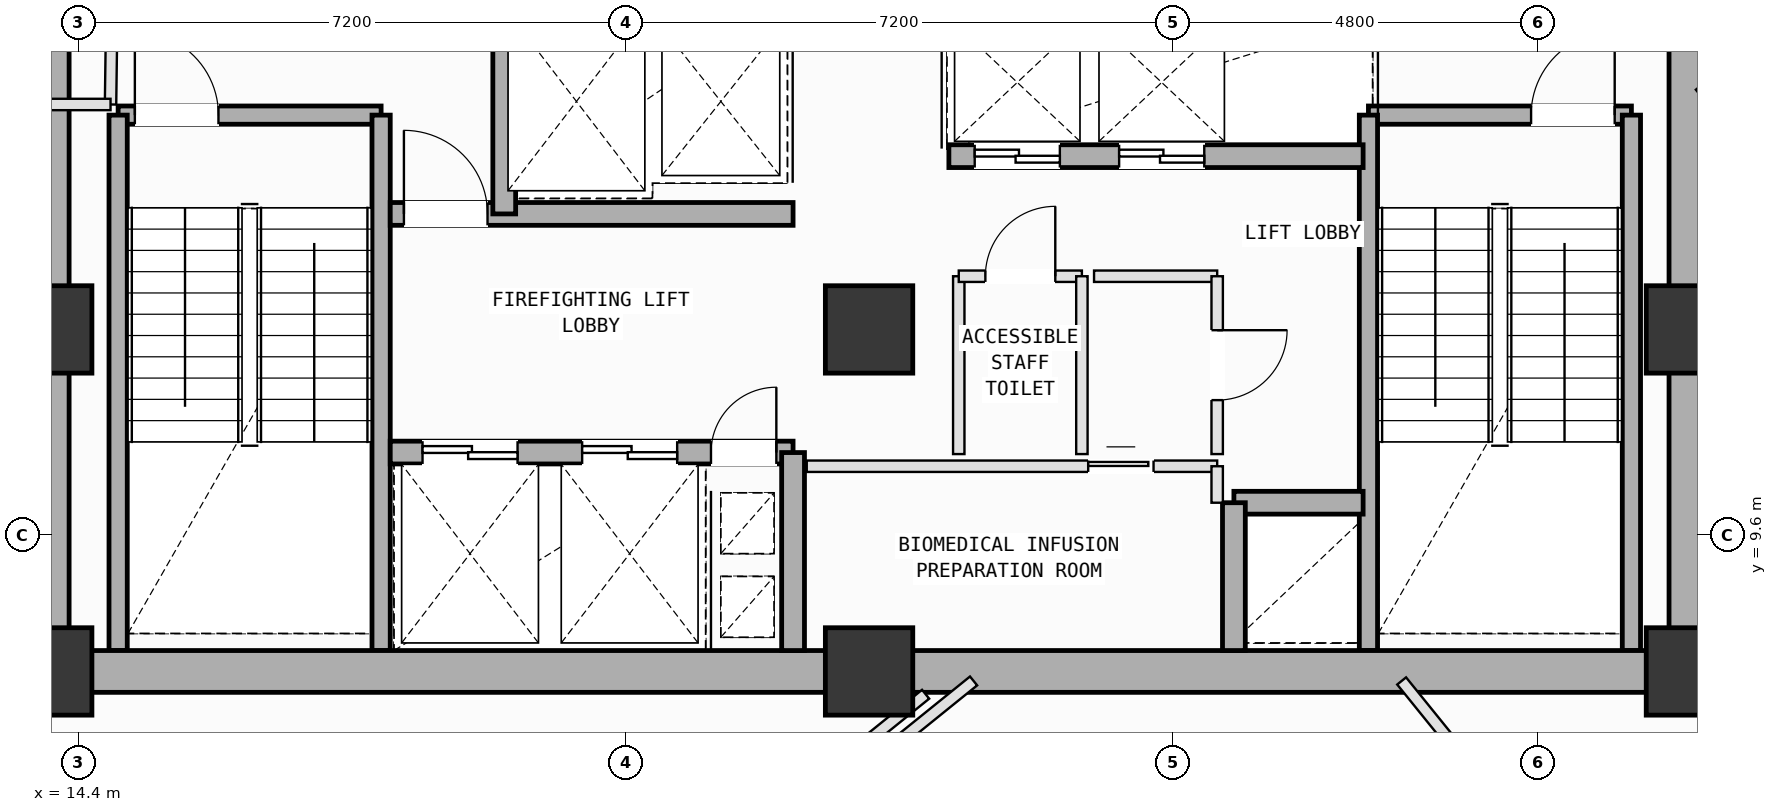
"""IFC4 building model, lengths in metres.
Left out: names, types, materials, properties, quantities, classifications, styles, units other than length and angle.
Written with IfcOpenShell. Run it as: python <this file> out.ifc"""

import sys

from ifc_helpers import new_model, si_unit, direction, frame, frame_2d, origin, origin_2d, place, context, subcontext, project, spatial, rectangle, extrude, element, fill, save


model = new_model("IFC4")
c1 = context("Model", 3, precision=1e-05, world=origin(), true_north=direction((0.0, 1.0)))
c2 = subcontext(c1, "Body", "Model", "MODEL_VIEW")
j1 = project(units=[si_unit("LENGTHUNIT", "METRE"), si_unit("PLANEANGLEUNIT", "RADIAN")], contexts=[c1])
p1 = place(None, origin())
s1 = spatial("IfcSite", under=j1, at=p1, CompositionType="ELEMENT")
p2 = place(p1, origin())
s2 = spatial("IfcBuilding", under=s1, at=p2, CompositionType="ELEMENT")
p3 = place(p2, frame((0.0, 0.0, 189.8)))
s3 = spatial("IfcBuildingStorey", under=s2, at=p3, CompositionType="ELEMENT", Elevation=189.8)
for number, where, z_axis, x_axis in (
    (1, (14.0, 7.8, 0.0), (0.0, 0.0, 1.0), (1.0, 0.0, 0.0)),
    (2, (14.0, 12.3, 0.0), (0.0, 0.0, 1.0), (1.0, 0.0, 0.0)),
    (3, (24.8, 7.8, 0.0), (0.0, 0.0, 1.0), (1.0, 0.0, 0.0)),
    (4, (24.8, 12.3, 0.0), (0.0, 0.0, 1.0), (1.0, 0.0, 0.0)),
    (5, (35.6, 7.8, 0.0), (0.0, 0.0, 1.0), (1.0, 0.0, 0.0)),
    (6, (35.6, 12.3, 0.0), (0.0, 0.0, 1.0), (1.0, 0.0, 0.0)),
):
    element("IfcColumn", number, at=place(p3, frame(where, z_axis=z_axis, x_axis=x_axis)), inside=s3, PredefinedType="COLUMN", context=c2, shape_type="SweptSolid", body=[
        extrude(rectangle(XDim=1.15, YDim=1.15, at=origin_2d()), origin(), (0.0, 0.0, 1.0), 4.0),
    ])
p4 = place(p3, frame((16.108, 2.773, 0.0), z_axis=(0.0, 0.0, 1.0), x_axis=(-0.628635084849, 0.777700411532, 0.0)))
e7 = element("IfcWall", 7, at=p4, inside=s3, PredefinedType="SOLIDWALL", context=c2, shape_type="SweptSolid", body=[
    extrude(rectangle(XDim=7.36, YDim=0.28, at=frame_2d((3.68, 0.0))), origin(), (0.0, 0.0, 1.0), 3.265),
])
p5 = place(p4, frame((2.088, 0.0, 0.75)))
e8 = element("IfcOpeningElement", 8, at=p5, cuts=e7, PredefinedType="OPENING", context=c2, shape_type="SweptSolid", body=[
    extrude(rectangle(XDim=1.4, YDim=1.85, at=frame_2d((0.7, 0.925))), frame((0.0, 0.15, 0.0), z_axis=(0.0, -1.0, 0.0), x_axis=(1.0, 0.0, 0.0)), (0.0, 0.0, 1.0), 0.3),
])
p6 = place(p3, frame((14.92, 15.12, 0.0), z_axis=(0.0, 0.0, 1.0), x_axis=(1.0, 0.0, 0.0)))
e9 = element("IfcWall", 9, at=p6, inside=s3, PredefinedType="SOLIDWALL", context=c2, shape_type="SweptSolid", body=[
    extrude(rectangle(XDim=3.46, YDim=0.24, at=frame_2d((1.73, 0.0))), origin(), (0.0, 0.0, 1.0), 3.78),
])
p7 = place(p6, frame((0.22, 0.0, 0.0)))
e10 = element("IfcOpeningElement", 10, at=p7, cuts=e9, PredefinedType="OPENING", context=c2, shape_type="SweptSolid", body=[
    extrude(rectangle(XDim=1.1, YDim=2.15, at=frame_2d((0.55, 1.075))), frame((0.0, 0.13, 0.0), z_axis=(0.0, -1.0, 0.0), x_axis=(1.0, 0.0, 0.0)), (0.0, 0.0, 1.0), 0.26),
])
for number, where, z_axis, x_axis in (
    (11, (18.38, 15.12, 0.0), (0.0, 0.0, 1.0), (0.0, -1.0, 0.0)),
    (12, (14.92, 8.075, 0.0), (0.0, 0.0, 1.0), (0.0, 1.0, 0.0)),
):
    element("IfcWall", number, at=place(p3, frame(where, z_axis=z_axis, x_axis=x_axis)), inside=s3, PredefinedType="SOLIDWALL", context=c2, shape_type="SweptSolid", body=[
        extrude(rectangle(XDim=7.045, YDim=0.24, at=frame_2d((3.522, 0.0))), origin(), (0.0, 0.0, 1.0), 3.78),
    ])
p8 = place(p3, frame((31.37, 15.12, 0.0), z_axis=(0.0, 0.0, 1.0), x_axis=(1.0, 0.0, 0.0)))
e13 = element("IfcWall", 13, at=p8, inside=s3, PredefinedType="SOLIDWALL", context=c2, shape_type="SweptSolid", body=[
    extrude(rectangle(XDim=3.46, YDim=0.24, at=frame_2d((1.73, 0.0))), origin(), (0.0, 0.0, 1.0), 3.78),
])
p9 = place(p8, frame((2.14, 0.0, 0.0)))
e14 = element("IfcOpeningElement", 14, at=p9, cuts=e13, PredefinedType="OPENING", context=c2, shape_type="SweptSolid", body=[
    extrude(rectangle(XDim=1.1, YDim=2.15, at=frame_2d((0.55, 1.075))), frame((0.0, 0.13, 0.0), z_axis=(0.0, -1.0, 0.0), x_axis=(1.0, 0.0, 0.0)), (0.0, 0.0, 1.0), 0.26),
])
for number, where, z_axis, x_axis in (
    (15, (34.83, 15.12, 0.0), (0.0, 0.0, 1.0), (0.0, -1.0, 0.0)),
    (16, (31.37, 8.075, 0.0), (0.0, 0.0, 1.0), (0.0, 1.0, 0.0)),
):
    element("IfcWall", number, at=place(p3, frame(where, z_axis=z_axis, x_axis=x_axis)), inside=s3, PredefinedType="SOLIDWALL", context=c2, shape_type="SweptSolid", body=[
        extrude(rectangle(XDim=7.045, YDim=0.24, at=frame_2d((3.522, 0.0))), origin(), (0.0, 0.0, 1.0), 3.78),
    ])
for number, where, z_axis, x_axis in (
    (17, (14.0, 7.8, 0.0), (0.0, 0.0, 1.0), (1.0, 0.0, 0.0)),
    (18, (24.8, 7.8, 0.0), (0.0, 0.0, 1.0), (1.0, 0.0, 0.0)),
):
    element("IfcWall", number, at=place(p3, frame(where, z_axis=z_axis, x_axis=x_axis)), inside=s3, PredefinedType="SHEAR", context=c2, shape_type="SweptSolid", body=[
        extrude(rectangle(XDim=10.8, YDim=0.55, at=frame_2d((5.4, 0.0))), origin(), (0.0, 0.0, 1.0), 3.78),
    ])
for number, where, z_axis, x_axis in (
    (19, (35.6, 7.8, 0.0), (0.0, 0.0, 1.0), (0.0, 1.0, 0.0)),
    (20, (14.0, 16.8, 0.0), (0.0, 0.0, 1.0), (0.0, -1.0, 0.0)),
):
    element("IfcWall", number, at=place(p3, frame(where, z_axis=z_axis, x_axis=x_axis)), inside=s3, PredefinedType="SHEAR", context=c2, shape_type="SweptSolid", body=[
        extrude(rectangle(XDim=9.0, YDim=0.55, at=frame_2d((4.5, 0.0))), origin(), (0.0, 0.0, 1.0), 3.78),
    ])
p10 = place(p3, frame((18.5, 10.68, 0.0), z_axis=(0.0, 0.0, 1.0), x_axis=(1.0, 0.0, 0.0)))
e21 = element("IfcWall", 21, at=p10, inside=s3, PredefinedType="SOLIDWALL", context=c2, shape_type="SweptSolid", body=[
    extrude(rectangle(XDim=5.3, YDim=0.3, at=frame_2d((2.65, 0.0))), origin(), (0.0, 0.0, 1.0), 3.78),
])
p11 = place(p10, frame((4.22, 0.0, 0.0)))
e22 = element("IfcOpeningElement", 22, at=p11, cuts=e21, PredefinedType="OPENING", context=c2, shape_type="SweptSolid", body=[
    extrude(rectangle(XDim=0.86, YDim=2.06, at=frame_2d((0.43, 1.03))), frame((0.0, 0.16, 0.0), z_axis=(0.0, -1.0, 0.0), x_axis=(1.0, 0.0, 0.0)), (0.0, 0.0, 1.0), 0.32),
])
p12 = place(p10, frame((0.425, 0.0, 0.0)))
e23 = element("IfcOpeningElement", 23, at=p12, cuts=e21, PredefinedType="OPENING", context=c2, shape_type="SweptSolid", body=[
    extrude(rectangle(XDim=1.25, YDim=2.18, at=frame_2d((0.625, 1.09))), frame((0.0, 0.16, 0.0), z_axis=(0.0, -1.0, 0.0), x_axis=(1.0, 0.0, 0.0)), (0.0, 0.0, 1.0), 0.32),
])
p13 = place(p10, frame((2.525, 0.0, 0.0)))
e24 = element("IfcOpeningElement", 24, at=p13, cuts=e21, PredefinedType="OPENING", context=c2, shape_type="SweptSolid", body=[
    extrude(rectangle(XDim=1.25, YDim=2.18, at=frame_2d((0.625, 1.09))), frame((0.0, 0.16, 0.0), z_axis=(0.0, -1.0, 0.0), x_axis=(1.0, 0.0, 0.0)), (0.0, 0.0, 1.0), 0.32),
])
p14 = place(p3, frame((18.5, 13.82, 0.0), z_axis=(0.0, 0.0, 1.0), x_axis=(1.0, 0.0, 0.0)))
e25 = element("IfcWall", 25, at=p14, inside=s3, PredefinedType="SOLIDWALL", context=c2, shape_type="SweptSolid", body=[
    extrude(rectangle(XDim=5.3, YDim=0.3, at=frame_2d((2.65, 0.0))), origin(), (0.0, 0.0, 1.0), 3.78),
])
p15 = place(p14, frame((0.18, 0.0, 0.0)))
e26 = element("IfcOpeningElement", 26, at=p15, cuts=e25, PredefinedType="OPENING", context=c2, shape_type="SweptSolid", body=[
    extrude(rectangle(XDim=1.1, YDim=2.15, at=frame_2d((0.55, 1.075))), frame((0.0, 0.16, 0.0), z_axis=(0.0, -1.0, 0.0), x_axis=(1.0, 0.0, 0.0)), (0.0, 0.0, 1.0), 0.32),
])
p16 = place(p3, frame((23.8, 8.075, 0.0), z_axis=(0.0, 0.0, 1.0), x_axis=(0.0, 1.0, 0.0)))
e27 = element("IfcWall", 27, at=p16, inside=s3, PredefinedType="SOLIDWALL", context=c2, shape_type="SweptSolid", body=[
    extrude(rectangle(XDim=2.605, YDim=0.3, at=frame_2d((1.302, 0.0))), origin(), (0.0, 0.0, 1.0), 3.78),
])
p17 = place(p3, frame((20.0, 13.82, 0.0), z_axis=(0.0, 0.0, 1.0), x_axis=(0.0, 1.0, 0.0)))
e28 = element("IfcWall", 28, at=p17, inside=s3, PredefinedType="SOLIDWALL", context=c2, shape_type="SweptSolid", body=[
    extrude(rectangle(XDim=2.73, YDim=0.3, at=frame_2d((1.365, 0.0))), origin(), (0.0, 0.0, 1.0), 3.78),
])
p18 = place(p3, frame((29.6, 10.02, 0.0), z_axis=(0.0, 0.0, 1.0), x_axis=(1.0, 0.0, 0.0)))
e29 = element("IfcWall", 29, at=p18, inside=s3, PredefinedType="SOLIDWALL", context=c2, shape_type="SweptSolid", body=[
    extrude(rectangle(XDim=1.7, YDim=0.3, at=frame_2d((0.85, 0.0))), origin(), (0.0, 0.0, 1.0), 3.78),
])
p19 = place(p3, frame((29.6, 8.075, 0.0), z_axis=(0.0, 0.0, 1.0), x_axis=(0.0, 1.0, 0.0)))
e30 = element("IfcWall", 30, at=p19, inside=s3, PredefinedType="SOLIDWALL", context=c2, shape_type="SweptSolid", body=[
    extrude(rectangle(XDim=1.945, YDim=0.3, at=frame_2d((0.973, 0.0))), origin(), (0.0, 0.0, 1.0), 3.78),
])
p20 = place(p3, frame((25.85, 14.58, 0.0), z_axis=(0.0, 0.0, 1.0), x_axis=(1.0, 0.0, 0.0)))
e31 = element("IfcWall", 31, at=p20, inside=s3, PredefinedType="SOLIDWALL", context=c2, shape_type="SweptSolid", body=[
    extrude(rectangle(XDim=5.45, YDim=0.3, at=frame_2d((2.725, 0.0))), origin(), (0.0, 0.0, 1.0), 3.78),
])
p21 = place(p20, frame((0.34, 0.0, 0.0)))
e32 = element("IfcOpeningElement", 32, at=p21, cuts=e31, PredefinedType="OPENING", context=c2, shape_type="SweptSolid", body=[
    extrude(rectangle(XDim=1.12, YDim=2.15, at=frame_2d((0.56, 1.075))), frame((0.0, 0.16, 0.0), z_axis=(0.0, -1.0, 0.0), x_axis=(1.0, 0.0, 0.0)), (0.0, 0.0, 1.0), 0.32),
])
p22 = place(p20, frame((2.24, 0.0, 0.0)))
e33 = element("IfcOpeningElement", 33, at=p22, cuts=e31, PredefinedType="OPENING", context=c2, shape_type="SweptSolid", body=[
    extrude(rectangle(XDim=1.12, YDim=2.15, at=frame_2d((0.56, 1.075))), frame((0.0, 0.16, 0.0), z_axis=(0.0, -1.0, 0.0), x_axis=(1.0, 0.0, 0.0)), (0.0, 0.0, 1.0), 0.32),
])
p23 = place(p3, frame((23.98, 10.5, 0.0), z_axis=(0.0, 0.0, 1.0), x_axis=(1.0, 0.0, 0.0)))
e34 = element("IfcWall", 34, at=p23, inside=s3, PredefinedType="PARTITIONING", context=c2, shape_type="SweptSolid", body=[
    extrude(rectangle(XDim=5.4, YDim=0.15, at=frame_2d((2.7, 0.0))), origin(), (0.0, 0.0, 1.0), 3.78),
])
p24 = place(p23, frame((3.703, 0.0, 0.0)))
e35 = element("IfcOpeningElement", 35, at=p24, cuts=e34, PredefinedType="OPENING", context=c2, shape_type="SweptSolid", body=[
    extrude(rectangle(XDim=0.86, YDim=2.06, at=frame_2d((0.43, 1.03))), frame((0.0, 0.085, 0.0), z_axis=(0.0, -1.0, 0.0), x_axis=(1.0, 0.0, 0.0)), (0.0, 0.0, 1.0), 0.17),
])
p25 = place(p3, frame((29.38, 10.5, 0.0), z_axis=(0.0, 0.0, 1.0), x_axis=(0.0, -1.0, 0.0)))
e36 = element("IfcWall", 36, at=p25, inside=s3, PredefinedType="PARTITIONING", context=c2, shape_type="SweptSolid", body=[
    extrude(rectangle(XDim=0.48, YDim=0.15, at=frame_2d((0.24, 0.0))), origin(), (0.0, 0.0, 1.0), 3.78),
])
p26 = place(p3, frame((25.98, 10.66, 0.0), z_axis=(0.0, 0.0, 1.0), x_axis=(0.0, 1.0, 0.0)))
e37 = element("IfcWall", 37, at=p26, inside=s3, PredefinedType="PARTITIONING", context=c2, shape_type="SweptSolid", body=[
    extrude(rectangle(XDim=2.34, YDim=0.15, at=frame_2d((1.17, 0.0))), origin(), (0.0, 0.0, 1.0), 3.78),
])
p27 = place(p3, frame((25.98, 13.0, 0.0), z_axis=(0.0, 0.0, 1.0), x_axis=(1.0, 0.0, 0.0)))
e38 = element("IfcWall", 38, at=p27, inside=s3, PredefinedType="PARTITIONING", context=c2, shape_type="SweptSolid", body=[
    extrude(rectangle(XDim=1.62, YDim=0.15, at=frame_2d((0.81, 0.0))), origin(), (0.0, 0.0, 1.0), 3.78),
])
p28 = place(p27, frame((0.35, 0.0, 0.0)))
e39 = element("IfcOpeningElement", 39, at=p28, cuts=e38, PredefinedType="OPENING", context=c2, shape_type="SweptSolid", body=[
    extrude(rectangle(XDim=0.92, YDim=2.1, at=frame_2d((0.46, 1.05))), frame((0.0, 0.085, 0.0), z_axis=(0.0, -1.0, 0.0), x_axis=(1.0, 0.0, 0.0)), (0.0, 0.0, 1.0), 0.17),
])
p29 = place(p3, frame((27.6, 13.0, 0.0), z_axis=(0.0, 0.0, 1.0), x_axis=(0.0, -1.0, 0.0)))
e40 = element("IfcWall", 40, at=p29, inside=s3, PredefinedType="PARTITIONING", context=c2, shape_type="SweptSolid", body=[
    extrude(rectangle(XDim=2.34, YDim=0.15, at=frame_2d((1.17, 0.0))), origin(), (0.0, 0.0, 1.0), 3.78),
])
p30 = place(p3, frame((27.76, 13.0, 0.0), z_axis=(0.0, 0.0, 1.0), x_axis=(1.0, 0.0, 0.0)))
e41 = element("IfcWall", 41, at=p30, inside=s3, PredefinedType="PARTITIONING", context=c2, shape_type="SweptSolid", body=[
    extrude(rectangle(XDim=1.62, YDim=0.15, at=frame_2d((0.81, 0.0))), origin(), (0.0, 0.0, 1.0), 3.78),
])
p31 = place(p3, frame((29.38, 13.0, 0.0), z_axis=(0.0, 0.0, 1.0), x_axis=(0.0, -1.0, 0.0)))
e42 = element("IfcWall", 42, at=p31, inside=s3, PredefinedType="PARTITIONING", context=c2, shape_type="SweptSolid", body=[
    extrude(rectangle(XDim=2.34, YDim=0.15, at=frame_2d((1.17, 0.0))), origin(), (0.0, 0.0, 1.0), 3.78),
])
p32 = place(p31, frame((0.71, 0.0, 0.0)))
e43 = element("IfcOpeningElement", 43, at=p32, cuts=e42, PredefinedType="OPENING", context=c2, shape_type="SweptSolid", body=[
    extrude(rectangle(XDim=0.92, YDim=2.1, at=frame_2d((0.46, 1.05))), frame((0.0, 0.085, 0.0), z_axis=(0.0, -1.0, 0.0), x_axis=(1.0, 0.0, 0.0)), (0.0, 0.0, 1.0), 0.17),
])
p33 = place(p3, frame((23.639, 5.626, 0.0), z_axis=(0.0, 0.0, 1.0), x_axis=(0.777842628049, 0.628459104468, 0.0)))
e44 = element("IfcWall", 44, at=p33, inside=s3, PredefinedType="PARTITIONING", context=c2, shape_type="SweptSolid", body=[
    extrude(rectangle(XDim=3.26, YDim=0.15, at=frame_2d((1.63, 0.0))), origin(), (0.0, 0.0, 1.0), 3.78),
])
p34 = place(p3, frame((31.807, 7.675, 0.0), z_axis=(0.0, 0.0, 1.0), x_axis=(0.628606219848, -0.777723742963, 0.0)))
e45 = element("IfcWall", 45, at=p34, inside=s3, PredefinedType="PARTITIONING", context=c2, shape_type="SweptSolid", body=[
    extrude(rectangle(XDim=9.945, YDim=0.15, at=frame_2d((4.972, 0.0))), origin(), (0.0, 0.0, 1.0), 3.78),
])
p35 = place(p34, frame((4.736, 0.0, 0.0)))
e46 = element("IfcOpeningElement", 46, at=p35, cuts=e45, PredefinedType="OPENING", context=c2, shape_type="SweptSolid", body=[
    extrude(rectangle(XDim=0.86, YDim=2.06, at=frame_2d((0.43, 1.03))), frame((0.0, 0.085, 0.0), z_axis=(0.0, -1.0, 0.0), x_axis=(1.0, 0.0, 0.0)), (0.0, 0.0, 1.0), 0.17),
])
p36 = place(p3, frame((35.6, 7.5, 0.0), z_axis=(0.0, 0.0, 1.0), x_axis=(1.0, 0.0, 0.0)))
e47 = element("IfcWall", 47, at=p36, inside=s3, PredefinedType="PARTITIONING", context=c2, shape_type="SweptSolid", body=[
    extrude(rectangle(XDim=0.55, YDim=0.15, at=frame_2d((0.275, 0.0))), origin(), (0.0, 0.0, 1.0), 3.78),
])
p37 = place(p3, frame((35.725, 15.396, 0.0), z_axis=(0.0, 0.0, 1.0), x_axis=(0.777858887674, 0.628438979429, 0.0)))
e48 = element("IfcWall", 48, at=p37, inside=s3, PredefinedType="PARTITIONING", context=c2, shape_type="SweptSolid", body=[
    extrude(rectangle(XDim=4.016, YDim=0.15, at=frame_2d((2.008, 0.0))), origin(), (0.0, 0.0, 1.0), 3.78),
])
p38 = place(p37, frame((1.821, 0.0, 0.0)))
e49 = element("IfcOpeningElement", 49, at=p38, cuts=e48, PredefinedType="OPENING", context=c2, shape_type="SweptSolid", body=[
    extrude(rectangle(XDim=1.2, YDim=2.15, at=frame_2d((0.6, 1.075))), frame((0.0, 0.085, 0.0), z_axis=(0.0, -1.0, 0.0), x_axis=(1.0, 0.0, 0.0)), (0.0, 0.0, 1.0), 0.17),
])
p39 = place(p3, frame((25.544, 7.5, 0.0), z_axis=(0.0, 0.0, 1.0), x_axis=(-0.777674119326, -0.628667610213, 0.0)))
e50 = element("IfcWall", 50, at=p39, inside=s3, PredefinedType="PARTITIONING", context=c2, shape_type="SweptSolid", body=[
    extrude(rectangle(XDim=10.195, YDim=0.15, at=frame_2d((5.097, 0.0))), origin(), (0.0, 0.0, 1.0), 3.78),
])
p40 = place(p3, frame((14.841, 16.8, 0.0), z_axis=(0.0, 0.0, 1.0), x_axis=(-0.01363221443, -0.999907077048, 0.0)))
e51 = element("IfcWall", 51, at=p40, inside=s3, PredefinedType="PARTITIONING", context=c2, shape_type="SweptSolid", body=[
    extrude(rectangle(XDim=1.54, YDim=0.15, at=frame_2d((0.77, 0.0))), origin(), (0.0, 0.0, 1.0), 3.78),
])
p41 = place(p3, frame((14.82, 15.26, 0.0), z_axis=(0.0, 0.0, 1.0), x_axis=(-1.0, 0.0, 0.0)))
e52 = element("IfcWall", 52, at=p41, inside=s3, PredefinedType="PARTITIONING", context=c2, shape_type="SweptSolid", body=[
    extrude(rectangle(XDim=1.12, YDim=0.15, at=frame_2d((0.56, 0.0))), origin(), (0.0, 0.0, 1.0), 3.78),
])
p42 = place(p3, frame((7.407, 13.721, 0.0), z_axis=(0.0, 0.0, 1.0), x_axis=(0.777667368678, 0.628675960805, 0.0)))
e53 = element("IfcWall", 53, at=p42, inside=s3, PredefinedType="PARTITIONING", context=c2, shape_type="SweptSolid", body=[
    extrude(rectangle(XDim=9.725, YDim=0.15, at=frame_2d((4.863, 0.0))), origin(), (0.0, 0.0, 1.0), 3.78),
])
p43 = place(p42, frame((4.433, 0.0, 0.0)))
e54 = element("IfcOpeningElement", 54, at=p43, cuts=e53, PredefinedType="OPENING", context=c2, shape_type="SweptSolid", body=[
    extrude(rectangle(XDim=0.86, YDim=2.06, at=frame_2d((0.43, 1.03))), frame((0.0, 0.085, 0.0), z_axis=(0.0, -1.0, 0.0), x_axis=(1.0, 0.0, 0.0)), (0.0, 0.0, 1.0), 0.17),
])
p44 = place(p7, origin())
e55 = element("IfcDoor", 55, at=p44, inside=s3, OperationType="SINGLE_SWING_LEFT", PredefinedType="DOOR", context=c2, shape_type="SweptSolid", body=[
    extrude(rectangle(XDim=1.1, YDim=2.15, at=frame_2d((0.55, 1.075))), frame((0.0, 0.025, 0.0), z_axis=(0.0, -1.0, 0.0), x_axis=(1.0, 0.0, 0.0)), (0.0, 0.0, 1.0), 0.05),
])
fill(e10, e55)
p45 = place(p9, origin())
e56 = element("IfcDoor", 56, at=p45, inside=s3, OperationType="SINGLE_SWING_RIGHT", PredefinedType="DOOR", context=c2, shape_type="SweptSolid", body=[
    extrude(rectangle(XDim=1.1, YDim=2.15, at=frame_2d((0.55, 1.075))), frame((0.0, 0.025, 0.0), z_axis=(0.0, -1.0, 0.0), x_axis=(1.0, 0.0, 0.0)), (0.0, 0.0, 1.0), 0.05),
])
fill(e14, e56)
p46 = place(p11, origin())
e57 = element("IfcDoor", 57, at=p46, inside=s3, OperationType="SINGLE_SWING_RIGHT", PredefinedType="DOOR", context=c2, shape_type="SweptSolid", body=[
    extrude(rectangle(XDim=0.86, YDim=2.06, at=frame_2d((0.43, 1.03))), frame((0.0, 0.025, 0.0), z_axis=(0.0, -1.0, 0.0), x_axis=(1.0, 0.0, 0.0)), (0.0, 0.0, 1.0), 0.05),
])
fill(e22, e57)
p47 = place(p15, origin())
e58 = element("IfcDoor", 58, at=p47, inside=s3, OperationType="SINGLE_SWING_LEFT", PredefinedType="DOOR", context=c2, shape_type="SweptSolid", body=[
    extrude(rectangle(XDim=1.1, YDim=2.15, at=frame_2d((0.55, 1.075))), frame((0.0, 0.025, 0.0), z_axis=(0.0, -1.0, 0.0), x_axis=(1.0, 0.0, 0.0)), (0.0, 0.0, 1.0), 0.05),
])
fill(e26, e58)
p48 = place(p12, origin())
e59 = element("IfcDoor", 59, at=p48, inside=s3, OperationType="DOUBLE_DOOR_SLIDING", PredefinedType="DOOR", context=c2, shape_type="SweptSolid", body=[
    extrude(rectangle(XDim=1.25, YDim=2.18, at=frame_2d((0.625, 1.09))), frame((0.0, 0.025, 0.0), z_axis=(0.0, -1.0, 0.0), x_axis=(1.0, 0.0, 0.0)), (0.0, 0.0, 1.0), 0.05),
])
fill(e23, e59)
p49 = place(p13, origin())
e60 = element("IfcDoor", 60, at=p49, inside=s3, OperationType="DOUBLE_DOOR_SLIDING", PredefinedType="DOOR", context=c2, shape_type="SweptSolid", body=[
    extrude(rectangle(XDim=1.25, YDim=2.18, at=frame_2d((0.625, 1.09))), frame((0.0, 0.025, 0.0), z_axis=(0.0, -1.0, 0.0), x_axis=(1.0, 0.0, 0.0)), (0.0, 0.0, 1.0), 0.05),
])
fill(e24, e60)
p50 = place(p21, origin())
e61 = element("IfcDoor", 61, at=p50, inside=s3, OperationType="DOUBLE_DOOR_SLIDING", PredefinedType="DOOR", context=c2, shape_type="SweptSolid", body=[
    extrude(rectangle(XDim=1.12, YDim=2.15, at=frame_2d((0.56, 1.075))), frame((0.0, 0.025, 0.0), z_axis=(0.0, -1.0, 0.0), x_axis=(1.0, 0.0, 0.0)), (0.0, 0.0, 1.0), 0.05),
])
fill(e32, e61)
p51 = place(p22, origin())
e62 = element("IfcDoor", 62, at=p51, inside=s3, OperationType="DOUBLE_DOOR_SLIDING", PredefinedType="DOOR", context=c2, shape_type="SweptSolid", body=[
    extrude(rectangle(XDim=1.12, YDim=2.15, at=frame_2d((0.56, 1.075))), frame((0.0, 0.025, 0.0), z_axis=(0.0, -1.0, 0.0), x_axis=(1.0, 0.0, 0.0)), (0.0, 0.0, 1.0), 0.05),
])
fill(e33, e62)
p52 = place(p28, origin())
e63 = element("IfcDoor", 63, at=p52, inside=s3, OperationType="SINGLE_SWING_RIGHT", PredefinedType="DOOR", context=c2, shape_type="SweptSolid", body=[
    extrude(rectangle(XDim=0.92, YDim=2.1, at=frame_2d((0.46, 1.05))), frame((0.0, 0.025, 0.0), z_axis=(0.0, -1.0, 0.0), x_axis=(1.0, 0.0, 0.0)), (0.0, 0.0, 1.0), 0.05),
])
fill(e39, e63)
p53 = place(p32, origin())
e64 = element("IfcDoor", 64, at=p53, inside=s3, OperationType="SINGLE_SWING_LEFT", PredefinedType="DOOR", context=c2, shape_type="SweptSolid", body=[
    extrude(rectangle(XDim=0.92, YDim=2.1, at=frame_2d((0.46, 1.05))), frame((0.0, 0.025, 0.0), z_axis=(0.0, -1.0, 0.0), x_axis=(1.0, 0.0, 0.0)), (0.0, 0.0, 1.0), 0.05),
])
fill(e43, e64)
p54 = place(p24, origin())
e65 = element("IfcDoor", 65, at=p54, inside=s3, OperationType="SLIDING_TO_LEFT", PredefinedType="DOOR", context=c2, shape_type="SweptSolid", body=[
    extrude(rectangle(XDim=0.86, YDim=2.06, at=frame_2d((0.43, 1.03))), frame((0.0, 0.025, 0.0), z_axis=(0.0, -1.0, 0.0), x_axis=(1.0, 0.0, 0.0)), (0.0, 0.0, 1.0), 0.05),
])
fill(e35, e65)
save(model, sys.argv[1])
